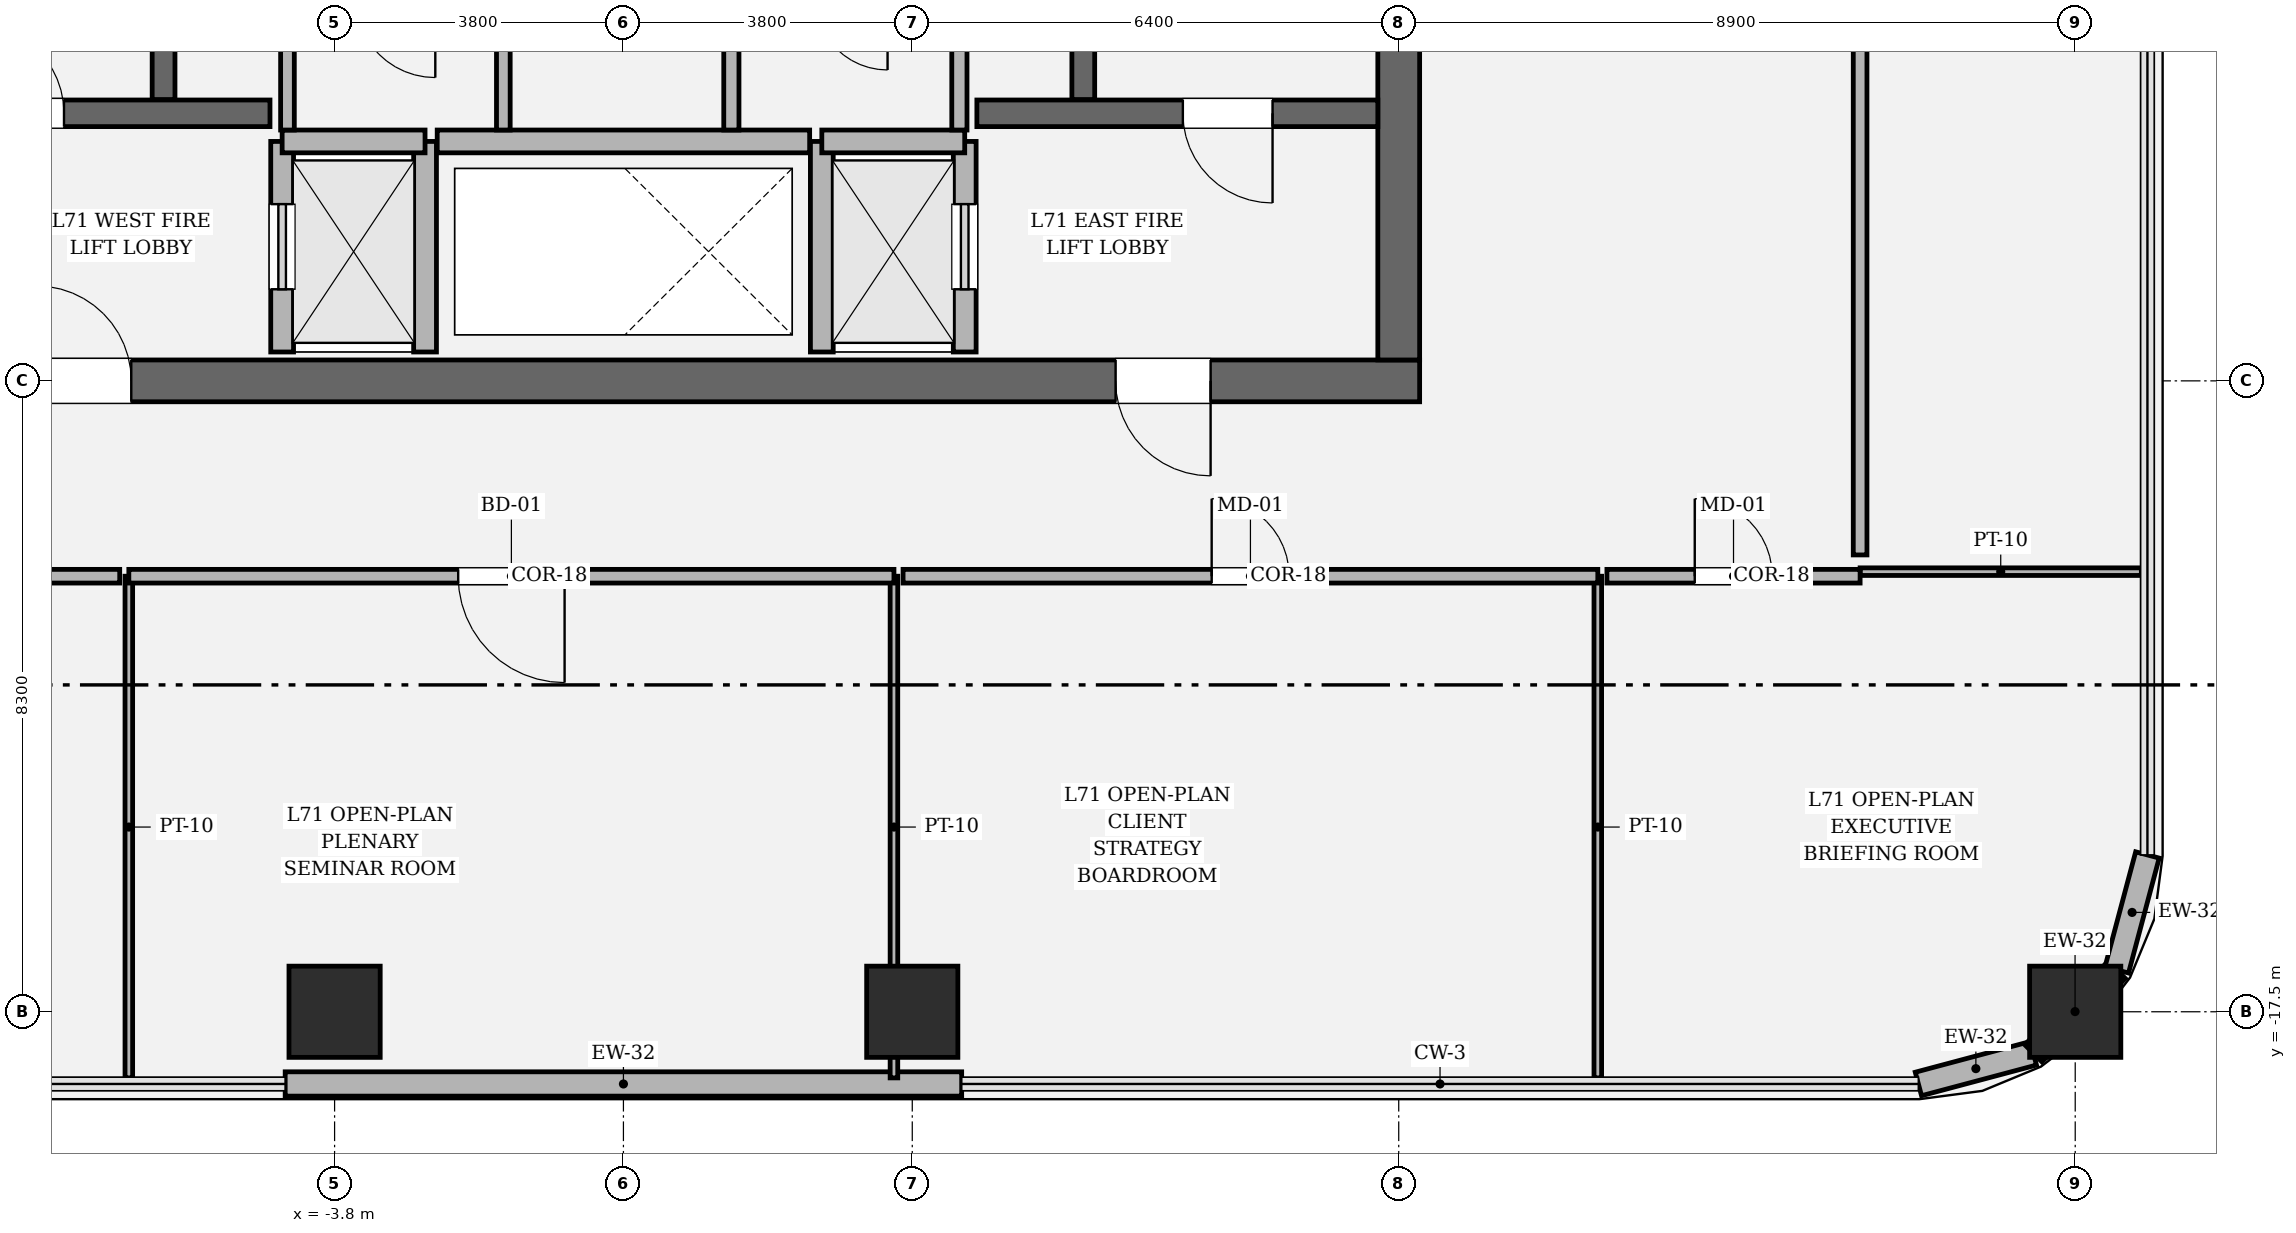
"""IFC4 building model, lengths in metres.
Left out: names, types, materials, properties, quantities, classifications, styles, units other than length and angle.
Written with IfcOpenShell. Run it as: python <this file> out.ifc"""

import sys

from ifc_helpers import new_model, si_unit, direction, frame, frame_2d, origin, origin_2d, place, context, subcontext, project, spatial, rectangle, hollow_rectangle, extrude, element, fill, save


model = new_model("IFC4")
c1 = context("Model", 3, precision=1e-05, world=origin(), true_north=direction((0.0, 1.0)))
c2 = subcontext(c1, "Body", "Model", "MODEL_VIEW")
j1 = project(units=[si_unit("LENGTHUNIT", "METRE"), si_unit("PLANEANGLEUNIT", "RADIAN")], contexts=[c1])
p1 = place(None, origin())
s1 = spatial("IfcSite", under=j1, at=p1, CompositionType="ELEMENT")
p2 = place(p1, origin())
s2 = spatial("IfcBuilding", under=s1, at=p2, CompositionType="ELEMENT")
p3 = place(p2, frame((0.0, 0.0, 300.6)))
s3 = spatial("IfcBuildingStorey", under=s2, at=p3, CompositionType="ELEMENT", Elevation=300.6)
p4 = place(p3, frame((10.475, -9.2, 0.0), z_axis=(0.0, 0.0, 1.0), x_axis=(-1.0, 0.0, 0.0)))
e1 = element("IfcWall", 1, at=p4, inside=s3, PredefinedType="SHEAR", context=c2, shape_type="SweptSolid", body=[
    extrude(rectangle(XDim=20.95, YDim=0.55, at=frame_2d((10.475, 0.0))), origin(), (0.0, 0.0, 1.0), 4.2),
])
p5 = place(p4, frame((2.75, 0.0, 0.0)))
e2 = element("IfcOpeningElement", 2, at=p5, cuts=e1, PredefinedType="OPENING", context=c2, shape_type="SweptSolid", body=[
    extrude(rectangle(XDim=1.25, YDim=2.25, at=frame_2d((0.625, 1.125))), frame((0.0, 0.285, 0.0), z_axis=(0.0, -1.0, 0.0), x_axis=(1.0, 0.0, 0.0)), (0.0, 0.0, 1.0), 0.57),
])
p6 = place(p4, frame((16.95, 0.0, 0.0)))
e3 = element("IfcOpeningElement", 3, at=p6, cuts=e1, PredefinedType="OPENING", context=c2, shape_type="SweptSolid", body=[
    extrude(rectangle(XDim=1.25, YDim=2.25, at=frame_2d((0.625, 1.125))), frame((0.0, 0.285, 0.0), z_axis=(0.0, -1.0, 0.0), x_axis=(1.0, 0.0, 0.0)), (0.0, 0.0, 1.0), 0.57),
])
p7 = place(p3, frame((10.2, 8.925, 0.0), z_axis=(0.0, 0.0, 1.0), x_axis=(0.0, -1.0, 0.0)))
e4 = element("IfcWall", 4, at=p7, inside=s3, PredefinedType="SHEAR", context=c2, shape_type="SweptSolid", body=[
    extrude(rectangle(XDim=17.85, YDim=0.55, at=frame_2d((8.925, 0.0))), origin(), (0.0, 0.0, 1.0), 4.2),
])
p8 = place(p7, frame((3.955, 0.0, 0.0)))
e5 = element("IfcOpeningElement", 5, at=p8, cuts=e4, PredefinedType="OPENING", context=c2, shape_type="SweptSolid", body=[
    extrude(rectangle(XDim=1.18, YDim=2.2, at=frame_2d((0.59, 1.1))), frame((0.0, 0.285, 0.0), z_axis=(0.0, -1.0, 0.0), x_axis=(1.0, 0.0, 0.0)), (0.0, 0.0, 1.0), 0.57),
])
for number, where, z_axis, x_axis in (
    (6, (-6.05, -5.5, 0.0), (0.0, 0.0, 1.0), (0.0, 1.0, 0.0)),
    (7, (6.05, 3.45, 0.0), (0.0, 0.0, 1.0), (0.0, -1.0, 0.0)),
):
    element("IfcWall", number, at=place(p3, frame(where, z_axis=z_axis, x_axis=x_axis)), inside=s3, PredefinedType="SOLIDWALL", context=c2, shape_type="SweptSolid", body=[
        extrude(rectangle(XDim=8.95, YDim=0.3, at=frame_2d((4.475, 0.0))), origin(), (0.0, 0.0, 1.0), 4.2),
    ])
p9 = place(p3, frame((-9.925, -5.68, 0.0), z_axis=(0.0, 0.0, 1.0), x_axis=(1.0, 0.0, 0.0)))
e8 = element("IfcWall", 8, at=p9, inside=s3, PredefinedType="SOLIDWALL", context=c2, shape_type="SweptSolid", body=[
    extrude(rectangle(XDim=5.275, YDim=0.35, at=frame_2d((2.638, 0.0))), origin(), (0.0, 0.0, 1.0), 4.2),
])
p10 = place(p9, frame((1.385, 0.0, 0.0)))
e9 = element("IfcOpeningElement", 9, at=p10, cuts=e8, PredefinedType="OPENING", context=c2, shape_type="SweptSolid", body=[
    extrude(rectangle(XDim=1.18, YDim=2.2, at=frame_2d((0.59, 1.1))), frame((0.0, 0.185, 0.0), z_axis=(0.0, -1.0, 0.0), x_axis=(1.0, 0.0, 0.0)), (0.0, 0.0, 1.0), 0.37),
])
p11 = place(p3, frame((4.65, -5.68, 0.0), z_axis=(0.0, 0.0, 1.0), x_axis=(1.0, 0.0, 0.0)))
e10 = element("IfcWall", 10, at=p11, inside=s3, PredefinedType="SOLIDWALL", context=c2, shape_type="SweptSolid", body=[
    extrude(rectangle(XDim=5.275, YDim=0.35, at=frame_2d((2.638, 0.0))), origin(), (0.0, 0.0, 1.0), 4.2),
])
p12 = place(p11, frame((2.71, 0.0, 0.0)))
e11 = element("IfcOpeningElement", 11, at=p12, cuts=e10, PredefinedType="OPENING", context=c2, shape_type="SweptSolid", body=[
    extrude(rectangle(XDim=1.18, YDim=2.2, at=frame_2d((0.59, 1.1))), frame((0.0, 0.185, 0.0), z_axis=(0.0, -1.0, 0.0), x_axis=(1.0, 0.0, 0.0)), (0.0, 0.0, 1.0), 0.37),
])
for number, where, z_axis, x_axis in (
    (12, (-3.8, -17.5, 0.0), (0.0, 0.0, 1.0), (1.0, 0.0, 0.0)),
    (13, (3.8, -17.5, 0.0), (0.0, 0.0, 1.0), (1.0, 0.0, 0.0)),
    (14, (19.1, -17.5, 0.0), (0.0, 0.0, 1.0), (1.0, 0.0, 0.0)),
):
    element("IfcColumn", number, at=place(p3, frame(where, z_axis=z_axis, x_axis=x_axis)), inside=s3, PredefinedType="COLUMN", context=c2, shape_type="SweptSolid", body=[
        extrude(hollow_rectangle(XDim=1.2, YDim=1.2, WallThickness=0.035, at=origin_2d()), origin(), (0.0, 0.0, 1.0), 4.2),
    ])
p13 = place(p3, frame((-4.45, -18.45, 0.0), z_axis=(0.0, 0.0, 1.0), x_axis=(1.0, 0.0, 0.0)))
e15 = element("IfcWall", 15, at=p13, inside=s3, PredefinedType="SOLIDWALL", context=c2, shape_type="SweptSolid", body=[
    extrude(rectangle(XDim=8.9, YDim=0.32, at=frame_2d((4.45, 0.0))), origin(), (0.0, 0.0, 1.0), 4.0),
])
p14 = place(p3, frame((17.037, -18.45, 0.0), z_axis=(0.0, 0.0, 1.0), x_axis=(0.966224582397, 0.257701486942, 0.0)))
e16 = element("IfcWall", 16, at=p14, inside=s3, PredefinedType="SOLIDWALL", context=c2, shape_type="SweptSolid", body=[
    extrude(rectangle(XDim=1.565, YDim=0.32, at=frame_2d((0.783, 0.0))), origin(), (0.0, 0.0, 1.0), 4.0),
])
p15 = place(p3, frame((18.549, -18.047, 0.0), z_axis=(0.0, 0.0, 1.0), x_axis=(0.707106781187, 0.707106781187, 0.0)))
e17 = element("IfcWall", 17, at=p15, inside=s3, PredefinedType="SOLIDWALL", context=c2, shape_type="SweptSolid", body=[
    extrude(rectangle(XDim=1.552, YDim=0.32, at=frame_2d((0.776, 0.0))), origin(), (0.0, 0.0, 1.0), 3.394),
])
p16 = place(p3, frame((19.646, -16.949, 0.0), z_axis=(0.0, 0.0, 1.0), x_axis=(0.257847112249, 0.966185730957, 0.0)))
e18 = element("IfcWall", 18, at=p16, inside=s3, PredefinedType="SOLIDWALL", context=c2, shape_type="SweptSolid", body=[
    extrude(rectangle(XDim=1.565, YDim=0.32, at=frame_2d((0.783, 0.0))), origin(), (0.0, 0.0, 1.0), 4.0),
])
p17 = place(p3, frame((-4.49, -8.82, 0.0), z_axis=(0.0, 0.0, 1.0), x_axis=(0.0, 1.0, 0.0)))
e19 = element("IfcWall", 19, at=p17, inside=s3, PredefinedType="SOLIDWALL", context=c2, shape_type="SweptSolid", body=[
    extrude(rectangle(XDim=2.77, YDim=0.3, at=frame_2d((1.385, 0.0))), origin(), (0.0, 0.0, 1.0), 4.0),
])
p18 = place(p17, frame((0.825, 0.0, 0.0)))
e20 = element("IfcOpeningElement", 20, at=p18, cuts=e19, PredefinedType="OPENING", context=c2, shape_type="SweptSolid", body=[
    extrude(rectangle(XDim=1.12, YDim=2.25, at=frame_2d((0.56, 1.125))), frame((0.0, 0.16, 0.0), z_axis=(0.0, -1.0, 0.0), x_axis=(1.0, 0.0, 0.0)), (0.0, 0.0, 1.0), 0.32),
])
p19 = place(p3, frame((-2.61, -8.82, 0.0), z_axis=(0.0, 0.0, 1.0), x_axis=(0.0, 1.0, 0.0)))
e21 = element("IfcWall", 21, at=p19, inside=s3, PredefinedType="SOLIDWALL", context=c2, shape_type="SweptSolid", body=[
    extrude(rectangle(XDim=2.77, YDim=0.3, at=frame_2d((1.385, 0.0))), origin(), (0.0, 0.0, 1.0), 4.0),
])
p20 = place(p3, frame((-4.49, -6.05, 0.0), z_axis=(0.0, 0.0, 1.0), x_axis=(1.0, 0.0, 0.0)))
e22 = element("IfcWall", 22, at=p20, inside=s3, PredefinedType="SOLIDWALL", context=c2, shape_type="SweptSolid", body=[
    extrude(rectangle(XDim=1.88, YDim=0.3, at=frame_2d((0.94, 0.0))), origin(), (0.0, 0.0, 1.0), 4.0),
])
p21 = place(p3, frame((4.49, -8.82, 0.0), z_axis=(0.0, 0.0, 1.0), x_axis=(0.0, 1.0, 0.0)))
e23 = element("IfcWall", 23, at=p21, inside=s3, PredefinedType="SOLIDWALL", context=c2, shape_type="SweptSolid", body=[
    extrude(rectangle(XDim=2.77, YDim=0.3, at=frame_2d((1.385, 0.0))), origin(), (0.0, 0.0, 1.0), 4.0),
])
p22 = place(p21, frame((0.825, 0.0, 0.0)))
e24 = element("IfcOpeningElement", 24, at=p22, cuts=e23, PredefinedType="OPENING", context=c2, shape_type="SweptSolid", body=[
    extrude(rectangle(XDim=1.12, YDim=2.25, at=frame_2d((0.56, 1.125))), frame((0.0, 0.16, 0.0), z_axis=(0.0, -1.0, 0.0), x_axis=(1.0, 0.0, 0.0)), (0.0, 0.0, 1.0), 0.32),
])
p23 = place(p3, frame((2.61, -8.82, 0.0), z_axis=(0.0, 0.0, 1.0), x_axis=(0.0, 1.0, 0.0)))
e25 = element("IfcWall", 25, at=p23, inside=s3, PredefinedType="SOLIDWALL", context=c2, shape_type="SweptSolid", body=[
    extrude(rectangle(XDim=2.77, YDim=0.3, at=frame_2d((1.385, 0.0))), origin(), (0.0, 0.0, 1.0), 4.0),
])
p24 = place(p3, frame((2.61, -6.05, 0.0), z_axis=(0.0, 0.0, 1.0), x_axis=(1.0, 0.0, 0.0)))
e26 = element("IfcWall", 26, at=p24, inside=s3, PredefinedType="SOLIDWALL", context=c2, shape_type="SweptSolid", body=[
    extrude(rectangle(XDim=1.88, YDim=0.3, at=frame_2d((0.94, 0.0))), origin(), (0.0, 0.0, 1.0), 4.0),
])
p25 = place(p3, frame((-2.45, -6.05, 0.0), z_axis=(0.0, 0.0, 1.0), x_axis=(1.0, 0.0, 0.0)))
e27 = element("IfcWall", 27, at=p25, inside=s3, PredefinedType="SOLIDWALL", context=c2, shape_type="SweptSolid", body=[
    extrude(rectangle(XDim=4.9, YDim=0.3, at=frame_2d((2.45, 0.0))), origin(), (0.0, 0.0, 1.0), 4.0),
])
for number, where, z_axis, x_axis in (
    (28, (-1.58, -5.9, 0.0), (0.0, 0.0, 1.0), (0.0, 1.0, 0.0)),
    (29, (-4.42, -4.16, 0.0), (0.0, 0.0, 1.0), (0.0, -1.0, 0.0)),
):
    element("IfcWall", number, at=place(p3, frame(where, z_axis=z_axis, x_axis=x_axis)), inside=s3, PredefinedType="PARTITIONING", context=c2, shape_type="SweptSolid", body=[
        extrude(rectangle(XDim=1.74, YDim=0.18, at=frame_2d((0.87, 0.0))), origin(), (0.0, 0.0, 1.0), 4.0),
    ])
for number, where, z_axis, x_axis in (
    (30, (1.42, -5.9, 0.0), (0.0, 0.0, 1.0), (0.0, 1.0, 0.0)),
    (31, (4.42, -5.9, 0.0), (0.0, 0.0, 1.0), (0.0, 1.0, 0.0)),
):
    element("IfcWall", number, at=place(p3, frame(where, z_axis=z_axis, x_axis=x_axis)), inside=s3, PredefinedType="SOLIDWALL", context=c2, shape_type="SweptSolid", body=[
        extrude(rectangle(XDim=1.74, YDim=0.2, at=frame_2d((0.87, 0.0))), origin(), (0.0, 0.0, 1.0), 4.0),
    ])
for number, where, z_axis, x_axis in (
    (32, (3.559, -11.77, 0.0), (0.0, 0.0, 1.0), (0.0, -1.0, 0.0)),
    (33, (-6.507, -18.37, 0.0), (0.0, 0.0, 1.0), (0.0, 1.0, 0.0)),
):
    element("IfcWall", number, at=place(p3, frame(where, z_axis=z_axis, x_axis=x_axis)), inside=s3, PredefinedType="PARTITIONING", context=c2, shape_type="SweptSolid", body=[
        extrude(rectangle(XDim=6.6, YDim=0.1, at=frame_2d((3.3, 0.0))), origin(), (0.0, 0.0, 1.0), 3.394),
    ])
p26 = place(p3, frame((-6.507, -11.77, 0.0), z_axis=(0.0, 0.0, 1.0), x_axis=(1.0, 0.0, 0.0)))
e34 = element("IfcWall", 34, at=p26, inside=s3, PredefinedType="PARTITIONING", context=c2, shape_type="SweptSolid", body=[
    extrude(rectangle(XDim=10.066, YDim=0.18, at=frame_2d((5.033, 0.0))), origin(), (0.0, 0.0, 1.0), 3.394),
])
p27 = place(p26, frame((4.333, 0.0, 0.0)))
e35 = element("IfcOpeningElement", 35, at=p27, cuts=e34, PredefinedType="OPENING", context=c2, shape_type="SweptSolid", body=[
    extrude(rectangle(XDim=1.4, YDim=2.25, at=frame_2d((0.7, 1.125))), frame((0.0, 0.1, 0.0), z_axis=(0.0, -1.0, 0.0), x_axis=(1.0, 0.0, 0.0)), (0.0, 0.0, 1.0), 0.2),
])
p28 = place(p3, frame((12.819, -11.77, 0.0), z_axis=(0.0, 0.0, 1.0), x_axis=(0.0, -1.0, 0.0)))
e36 = element("IfcWall", 36, at=p28, inside=s3, PredefinedType="PARTITIONING", context=c2, shape_type="SweptSolid", body=[
    extrude(rectangle(XDim=6.6, YDim=0.1, at=frame_2d((3.3, 0.0))), origin(), (0.0, 0.0, 1.0), 3.394),
])
p29 = place(p3, frame((3.679, -11.77, 0.0), z_axis=(0.0, 0.0, 1.0), x_axis=(1.0, 0.0, 0.0)))
e37 = element("IfcWall", 37, at=p29, inside=s3, PredefinedType="PARTITIONING", context=c2, shape_type="SweptSolid", body=[
    extrude(rectangle(XDim=9.14, YDim=0.18, at=frame_2d((4.57, 0.0))), origin(), (0.0, 0.0, 1.0), 3.394),
])
p30 = place(p29, frame((4.06, 0.0, 0.0)))
e38 = element("IfcOpeningElement", 38, at=p30, cuts=e37, PredefinedType="OPENING", context=c2, shape_type="SweptSolid", body=[
    extrude(rectangle(XDim=1.02, YDim=2.2, at=frame_2d((0.51, 1.1))), frame((0.0, 0.1, 0.0), z_axis=(0.0, -1.0, 0.0), x_axis=(1.0, 0.0, 0.0)), (0.0, 0.0, 1.0), 0.2),
])
p31 = place(p3, frame((-12.77, -11.77, 0.0), z_axis=(0.0, 0.0, 1.0), x_axis=(1.0, 0.0, 0.0)))
e39 = element("IfcWall", 39, at=p31, inside=s3, PredefinedType="PARTITIONING", context=c2, shape_type="SweptSolid", body=[
    extrude(rectangle(XDim=6.143, YDim=0.18, at=frame_2d((3.072, 0.0))), origin(), (0.0, 0.0, 1.0), 3.394),
])
p32 = place(p31, frame((2.372, 0.0, 0.0)))
e40 = element("IfcOpeningElement", 40, at=p32, cuts=e39, PredefinedType="OPENING", context=c2, shape_type="SweptSolid", body=[
    extrude(rectangle(XDim=1.4, YDim=2.25, at=frame_2d((0.7, 1.125))), frame((0.0, 0.1, 0.0), z_axis=(0.0, -1.0, 0.0), x_axis=(1.0, 0.0, 0.0)), (0.0, 0.0, 1.0), 0.2),
])
p33 = place(p3, frame((16.27, -11.71, 0.0), z_axis=(0.0, 0.0, 1.0), x_axis=(1.0, 0.0, 0.0)))
e41 = element("IfcWall", 41, at=p33, inside=s3, PredefinedType="PARTITIONING", context=c2, shape_type="SweptSolid", body=[
    extrude(rectangle(XDim=3.7, YDim=0.1, at=frame_2d((1.85, 0.0))), origin(), (0.0, 0.0, 1.0), 3.394),
])
p34 = place(p3, frame((12.939, -11.77, 0.0), z_axis=(0.0, 0.0, 1.0), x_axis=(1.0, 0.0, 0.0)))
e42 = element("IfcWall", 42, at=p34, inside=s3, PredefinedType="PARTITIONING", context=c2, shape_type="SweptSolid", body=[
    extrude(rectangle(XDim=3.331, YDim=0.18, at=frame_2d((1.666, 0.0))), origin(), (0.0, 0.0, 1.0), 3.634),
])
p35 = place(p34, frame((1.156, 0.0, 0.0)))
e43 = element("IfcOpeningElement", 43, at=p35, cuts=e42, PredefinedType="OPENING", context=c2, shape_type="SweptSolid", body=[
    extrude(rectangle(XDim=1.02, YDim=2.2, at=frame_2d((0.51, 1.1))), frame((0.0, 0.1, 0.0), z_axis=(0.0, -1.0, 0.0), x_axis=(1.0, 0.0, 0.0)), (0.0, 0.0, 1.0), 0.2),
])
p36 = place(p3, frame((16.27, -11.49, 0.0), z_axis=(0.0, 0.0, 1.0), x_axis=(0.0, 1.0, 0.0)))
e44 = element("IfcWall", 44, at=p36, inside=s3, PredefinedType="PARTITIONING", context=c2, shape_type="SweptSolid", body=[
    extrude(rectangle(XDim=17.16, YDim=0.18, at=frame_2d((8.58, 0.0))), origin(), (0.0, 0.0, 1.0), 3.394),
])
p37 = place(p36, frame((8.055, 0.0, 0.0)))
e45 = element("IfcOpeningElement", 45, at=p37, cuts=e44, PredefinedType="OPENING", context=c2, shape_type="SweptSolid", body=[
    extrude(rectangle(XDim=1.05, YDim=2.2, at=frame_2d((0.525, 1.1))), frame((0.0, 0.1, 0.0), z_axis=(0.0, -1.0, 0.0), x_axis=(1.0, 0.0, 0.0)), (0.0, 0.0, 1.0), 0.2),
])
p38 = place(p10, origin())
e46 = element("IfcDoor", 46, at=p38, inside=s3, OperationType="SINGLE_SWING_LEFT", PredefinedType="DOOR", context=c2, shape_type="SweptSolid", body=[
    extrude(rectangle(XDim=1.18, YDim=2.2, at=frame_2d((0.59, 1.1))), frame((0.0, 0.025, 0.0), z_axis=(0.0, -1.0, 0.0), x_axis=(1.0, 0.0, 0.0)), (0.0, 0.0, 1.0), 0.05),
])
fill(e9, e46)
p39 = place(p12, origin())
e47 = element("IfcDoor", 47, at=p39, inside=s3, OperationType="SINGLE_SWING_RIGHT", PredefinedType="DOOR", context=c2, shape_type="SweptSolid", body=[
    extrude(rectangle(XDim=1.18, YDim=2.2, at=frame_2d((0.59, 1.1))), frame((0.0, 0.025, 0.0), z_axis=(0.0, -1.0, 0.0), x_axis=(1.0, 0.0, 0.0)), (0.0, 0.0, 1.0), 0.05),
])
fill(e11, e47)
p40 = place(p5, origin())
e48 = element("IfcDoor", 48, at=p40, inside=s3, OperationType="SINGLE_SWING_LEFT", PredefinedType="DOOR", context=c2, shape_type="SweptSolid", body=[
    extrude(rectangle(XDim=1.25, YDim=2.25, at=frame_2d((0.625, 1.125))), frame((0.0, 0.025, 0.0), z_axis=(0.0, -1.0, 0.0), x_axis=(1.0, 0.0, 0.0)), (0.0, 0.0, 1.0), 0.05),
])
fill(e2, e48)
p41 = place(p6, origin())
e49 = element("IfcDoor", 49, at=p41, inside=s3, OperationType="SINGLE_SWING_RIGHT", PredefinedType="DOOR", context=c2, shape_type="SweptSolid", body=[
    extrude(rectangle(XDim=1.25, YDim=2.25, at=frame_2d((0.625, 1.125))), frame((0.0, 0.025, 0.0), z_axis=(0.0, -1.0, 0.0), x_axis=(1.0, 0.0, 0.0)), (0.0, 0.0, 1.0), 0.05),
])
fill(e3, e49)
p42 = place(p18, origin())
e50 = element("IfcDoor", 50, at=p42, inside=s3, OperationType="SLIDING_TO_LEFT", PredefinedType="DOOR", context=c2, shape_type="SweptSolid", body=[
    extrude(rectangle(XDim=1.12, YDim=2.25, at=frame_2d((0.56, 1.125))), frame((0.0, 0.025, 0.0), z_axis=(0.0, -1.0, 0.0), x_axis=(1.0, 0.0, 0.0)), (0.0, 0.0, 1.0), 0.05),
])
fill(e20, e50)
p43 = place(p22, origin())
e51 = element("IfcDoor", 51, at=p43, inside=s3, OperationType="SLIDING_TO_RIGHT", PredefinedType="DOOR", context=c2, shape_type="SweptSolid", body=[
    extrude(rectangle(XDim=1.12, YDim=2.25, at=frame_2d((0.56, 1.125))), frame((0.0, 0.025, 0.0), z_axis=(0.0, -1.0, 0.0), x_axis=(1.0, 0.0, 0.0)), (0.0, 0.0, 1.0), 0.05),
])
fill(e24, e51)
p44 = place(p27, origin())
e52 = element("IfcDoor", 52, at=p44, inside=s3, OperationType="SINGLE_SWING_RIGHT", PredefinedType="DOOR", context=c2, shape_type="SweptSolid", body=[
    extrude(rectangle(XDim=1.4, YDim=2.25, at=frame_2d((0.7, 1.125))), frame((0.0, 0.025, 0.0), z_axis=(0.0, -1.0, 0.0), x_axis=(1.0, 0.0, 0.0)), (0.0, 0.0, 1.0), 0.05),
])
fill(e35, e52)
p45 = place(p30, origin())
e53 = element("IfcDoor", 53, at=p45, inside=s3, OperationType="SINGLE_SWING_LEFT", PredefinedType="DOOR", context=c2, shape_type="SweptSolid", body=[
    extrude(rectangle(XDim=1.02, YDim=2.2, at=frame_2d((0.51, 1.1))), frame((0.0, 0.025, 0.0), z_axis=(0.0, -1.0, 0.0), x_axis=(1.0, 0.0, 0.0)), (0.0, 0.0, 1.0), 0.05),
])
fill(e38, e53)
p46 = place(p35, origin())
e54 = element("IfcDoor", 54, at=p46, inside=s3, OperationType="SINGLE_SWING_LEFT", PredefinedType="DOOR", context=c2, shape_type="SweptSolid", body=[
    extrude(rectangle(XDim=1.02, YDim=2.2, at=frame_2d((0.51, 1.1))), frame((0.0, 0.025, 0.0), z_axis=(0.0, -1.0, 0.0), x_axis=(1.0, 0.0, 0.0)), (0.0, 0.0, 1.0), 0.05),
])
fill(e43, e54)
save(model, sys.argv[1])
